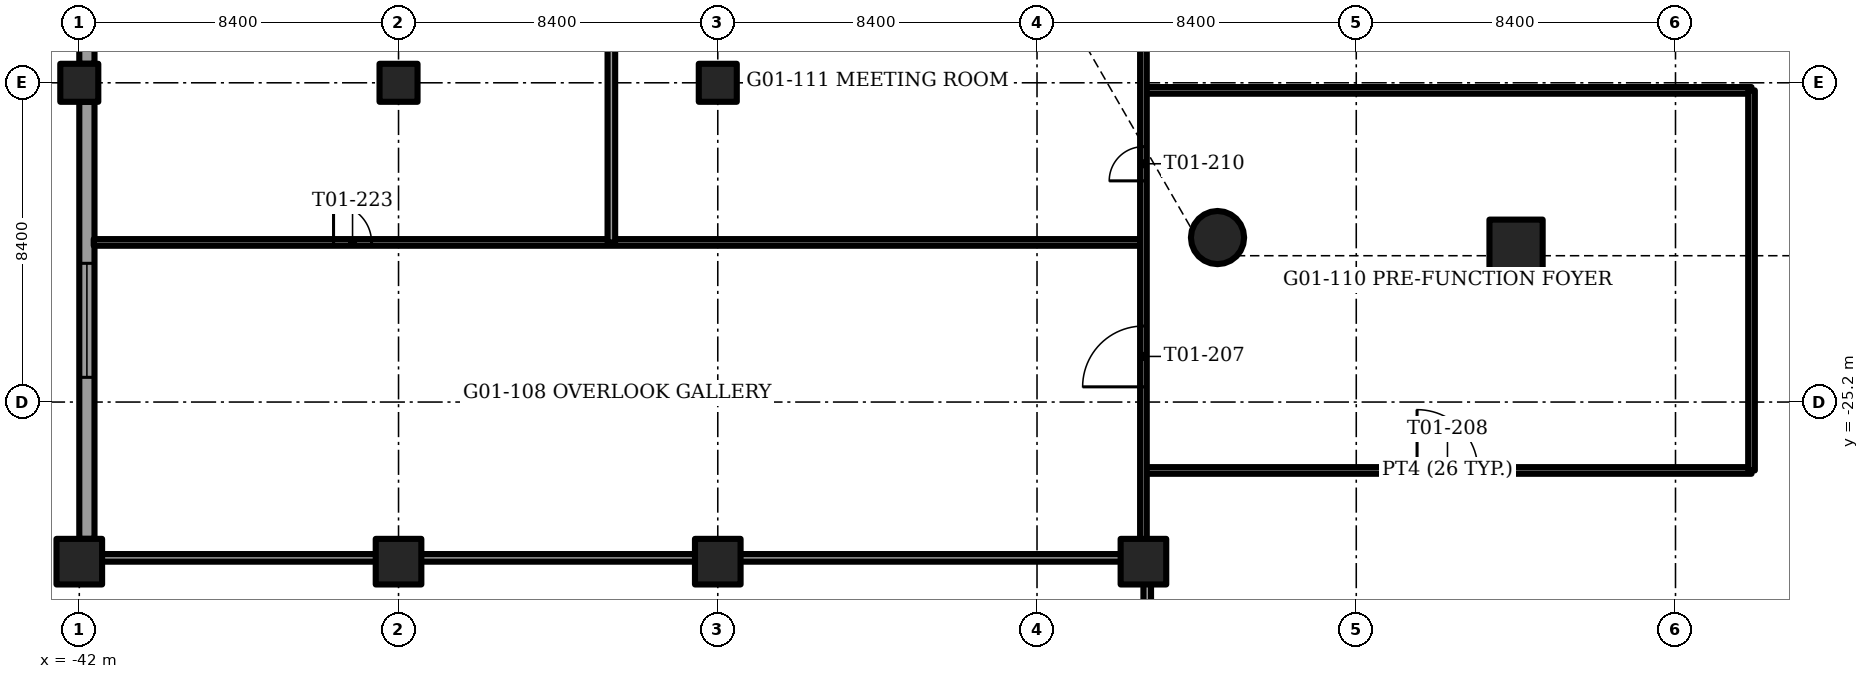
"""IFC4 building model, lengths in metres.
Left out: names, types, materials, properties, quantities, classifications, styles, units other than length and angle.
Written with IfcOpenShell. Run it as: python <this file> out.ifc"""

import sys

from ifc_helpers import new_model, si_unit, direction, frame, frame_2d, origin, origin_2d, place, context, subcontext, project, spatial, rectangle, circle, extrude, element, fill, save


model = new_model("IFC4")
c1 = context("Model", 3, precision=1e-05, world=origin(), true_north=direction((0.0, 1.0)))
c2 = subcontext(c1, "Body", "Model", "MODEL_VIEW")
j1 = project(units=[si_unit("LENGTHUNIT", "METRE"), si_unit("PLANEANGLEUNIT", "RADIAN")], contexts=[c1])
p1 = place(None, origin())
s1 = spatial("IfcSite", under=j1, at=p1, CompositionType="ELEMENT")
p2 = place(p1, origin())
s2 = spatial("IfcBuilding", under=s1, at=p2, CompositionType="ELEMENT")
p3 = place(p2, frame((0.0, 0.0, 6.0)))
s3 = spatial("IfcBuildingStorey", under=s2, at=p3, CompositionType="ELEMENT", Elevation=6.0)
for number, where, z_axis, x_axis in (
    (1, (-42.0, -16.8, -0.35), (0.0, 0.0, 1.0), (1.0, 0.0, 0.0)),
    (2, (-33.6, -16.8, -0.35), (0.0, 0.0, 1.0), (1.0, 0.0, 0.0)),
    (3, (-25.2, -16.8, -0.35), (0.0, 0.0, 1.0), (1.0, 0.0, 0.0)),
):
    element("IfcColumn", number, at=place(p3, frame(where, z_axis=z_axis, x_axis=x_axis)), inside=s3, PredefinedType="COLUMN", context=c2, shape_type="SweptSolid", body=[
        extrude(rectangle(XDim=1.0, YDim=1.0, at=origin_2d()), origin(), (0.0, 0.0, 1.0), 4.0),
    ])
for number, where, z_axis, x_axis in (
    (4, (-14.0, -29.4, -0.35), (0.0, 0.0, 1.0), (1.0, 0.0, 0.0)),
    (5, (-42.0, -29.4, -0.35), (0.0, 0.0, 1.0), (1.0, 0.0, 0.0)),
    (6, (-33.6, -29.4, -0.35), (0.0, 0.0, 1.0), (1.0, 0.0, 0.0)),
    (7, (-25.2, -29.4, -0.35), (0.0, 0.0, 1.0), (1.0, 0.0, 0.0)),
):
    element("IfcColumn", number, at=place(p3, frame(where, z_axis=z_axis, x_axis=x_axis)), inside=s3, PredefinedType="COLUMN", context=c2, shape_type="SweptSolid", body=[
        extrude(rectangle(XDim=1.2, YDim=1.2, at=origin_2d()), origin(), (0.0, 0.0, 1.0), 4.0),
    ])
p4 = place(p3, frame((-12.051, -20.872, -1.2), z_axis=(0.0, 0.0, 1.0), x_axis=(1.0, 0.0, 0.0)))
e8 = element("IfcColumn", 8, at=p4, inside=s3, PredefinedType="COLUMN", context=c2, shape_type="SweptSolid", body=[
    extrude(circle(Radius=0.7, at=origin_2d()), origin(), (0.0, 0.0, 1.0), 4.0),
])
p5 = place(p3, frame((-4.195, -21.1, -1.2), z_axis=(0.0, 0.0, 1.0), x_axis=(-1.0, 0.0, 0.0)))
e9 = element("IfcColumn", 9, at=p5, inside=s3, PredefinedType="COLUMN", context=c2, shape_type="SweptSolid", body=[
    extrude(rectangle(XDim=1.4, YDim=1.4, at=origin_2d()), origin(), (0.0, 0.0, 1.0), 4.0),
])
p6 = place(p3, frame((-41.8, -28.8, 0.0), z_axis=(0.0, 0.0, 1.0), x_axis=(0.0, 1.0, 0.0)))
e10 = element("IfcWall", 10, at=p6, inside=s3, PredefinedType="SOLIDWALL", context=c2, shape_type="SweptSolid", body=[
    extrude(rectangle(XDim=11.5, YDim=0.4, at=frame_2d((5.75, 0.0))), origin(), (0.0, 0.0, 1.0), 3.65),
])
p7 = place(p6, frame((4.25, 0.0, 1.0)))
e11 = element("IfcOpeningElement", 11, at=p7, cuts=e10, PredefinedType="OPENING", context=c2, shape_type="SweptSolid", body=[
    extrude(rectangle(XDim=3.0, YDim=2.2, at=frame_2d((1.5, 1.1))), frame((0.0, 0.2, 0.0), z_axis=(0.0, -1.0, 0.0), x_axis=(1.0, 0.0, 0.0)), (0.0, 0.0, 1.0), 0.4),
])
p8 = place(p3, frame((-41.8, -16.3, 0.0), z_axis=(0.0, 0.0, 1.0), x_axis=(0.0, 1.0, 0.0)))
e12 = element("IfcWall", 12, at=p8, inside=s3, PredefinedType="SOLIDWALL", context=c2, shape_type="SweptSolid", body=[
    extrude(rectangle(XDim=7.4, YDim=0.4, at=frame_2d((3.7, 0.0))), origin(), (0.0, 0.0, 1.0), 3.65),
])
p9 = place(p8, frame((2.2, 0.0, 1.0)))
e13 = element("IfcOpeningElement", 13, at=p9, cuts=e12, PredefinedType="OPENING", context=c2, shape_type="SweptSolid", body=[
    extrude(rectangle(XDim=3.0, YDim=2.2, at=frame_2d((1.5, 1.1))), frame((0.0, 0.2, 0.0), z_axis=(0.0, -1.0, 0.0), x_axis=(1.0, 0.0, 0.0)), (0.0, 0.0, 1.0), 0.4),
])
p10 = place(p3, frame((-13.9, -50.4, 0.0), z_axis=(0.0, 0.0, 1.0), x_axis=(0.0, 1.0, 0.0)))
e14 = element("IfcWall", 14, at=p10, inside=s3, PredefinedType="PARAPET", context=c2, shape_type="SweptSolid", body=[
    extrude(rectangle(XDim=21.0, YDim=0.2, at=frame_2d((10.5, 0.0))), origin(), (0.0, 0.0, 1.0), 1.1),
])
p11 = place(p3, frame((-14.0, -29.3, 0.0), z_axis=(0.0, 0.0, 1.0), x_axis=(-1.0, 0.0, 0.0)))
e15 = element("IfcWall", 15, at=p11, inside=s3, PredefinedType="PARAPET", context=c2, shape_type="SweptSolid", body=[
    extrude(rectangle(XDim=28.0, YDim=0.2, at=frame_2d((14.0, 0.0))), origin(), (0.0, 0.0, 1.0), 1.1),
])
p12 = place(p3, frame((-14.0, -27.0, 0.0), z_axis=(0.0, 0.0, 1.0), x_axis=(1.0, 0.0, 0.0)))
e16 = element("IfcWall", 16, at=p12, inside=s3, PredefinedType="PARTITIONING", context=c2, shape_type="SweptSolid", body=[
    extrude(rectangle(XDim=16.0, YDim=0.175, at=frame_2d((8.0, 0.0))), origin(), (0.0, 0.0, 1.0), 3.65),
])
p13 = place(p12, frame((7.2, 0.0, 0.0)))
e17 = element("IfcOpeningElement", 17, at=p13, cuts=e16, PredefinedType="OPENING", context=c2, shape_type="SweptSolid", body=[
    extrude(rectangle(XDim=1.6, YDim=2.1, at=frame_2d((0.8, 1.05))), frame((0.0, 0.087, 0.0), z_axis=(0.0, -1.0, 0.0), x_axis=(1.0, 0.0, 0.0)), (0.0, 0.0, 1.0), 0.175),
])
p14 = place(p3, frame((-41.62, -21.0, 0.0), z_axis=(0.0, 0.0, 1.0), x_axis=(1.0, 0.0, 0.0)))
e18 = element("IfcWall", 18, at=p14, inside=s3, PredefinedType="PARTITIONING", context=c2, shape_type="SweptSolid", body=[
    extrude(rectangle(XDim=27.62, YDim=0.175, at=frame_2d((13.81, 0.0))), origin(), (0.0, 0.0, 1.0), 3.65),
])
p15 = place(p14, frame((6.31, 0.0, 0.0)))
e19 = element("IfcOpeningElement", 19, at=p15, cuts=e18, PredefinedType="OPENING", context=c2, shape_type="SweptSolid", body=[
    extrude(rectangle(XDim=1.0, YDim=2.1, at=frame_2d((0.5, 1.05))), frame((0.0, 0.087, 0.0), z_axis=(0.0, -1.0, 0.0), x_axis=(1.0, 0.0, 0.0)), (0.0, 0.0, 1.0), 0.175),
])
p16 = place(p3, frame((-14.0, -17.0, 0.0), z_axis=(0.0, 0.0, 1.0), x_axis=(1.0, 0.0, 0.0)))
e20 = element("IfcWall", 20, at=p16, inside=s3, PredefinedType="PARTITIONING", context=c2, shape_type="SweptSolid", body=[
    extrude(rectangle(XDim=16.0, YDim=0.175, at=frame_2d((8.0, 0.0))), origin(), (0.0, 0.0, 1.0), 3.65),
])
p17 = place(p3, frame((-14.0, -29.195, 0.0), z_axis=(0.0, 0.0, 1.0), x_axis=(0.0, 1.0, 0.0)))
e21 = element("IfcWall", 21, at=p17, inside=s3, PredefinedType="PARTITIONING", context=c2, shape_type="SweptSolid", body=[
    extrude(rectangle(XDim=45.995, YDim=0.175, at=frame_2d((22.998, 0.0))), origin(), (0.0, 0.0, 1.0), 2.8),
])
p18 = place(p17, frame((4.395, 0.0, 0.0)))
e22 = element("IfcOpeningElement", 22, at=p18, cuts=e21, PredefinedType="OPENING", context=c2, shape_type="SweptSolid", body=[
    extrude(rectangle(XDim=1.6, YDim=2.1, at=frame_2d((0.8, 1.05))), frame((0.0, 0.087, 0.0), z_axis=(0.0, -1.0, 0.0), x_axis=(1.0, 0.0, 0.0)), (0.0, 0.0, 1.0), 0.175),
])
p19 = place(p17, frame((9.815, 0.0, 0.0)))
e23 = element("IfcOpeningElement", 23, at=p19, cuts=e21, PredefinedType="OPENING", context=c2, shape_type="SweptSolid", body=[
    extrude(rectangle(XDim=0.9, YDim=2.1, at=frame_2d((0.45, 1.05))), frame((0.0, 0.087, 0.0), z_axis=(0.0, -1.0, 0.0), x_axis=(1.0, 0.0, 0.0)), (0.0, 0.0, 1.0), 0.175),
])
p20 = place(p17, frame((20.595, 0.0, 0.0)))
e24 = element("IfcOpeningElement", 24, at=p20, cuts=e21, PredefinedType="OPENING", context=c2, shape_type="SweptSolid", body=[
    extrude(rectangle(XDim=1.0, YDim=2.1, at=frame_2d((0.5, 1.05))), frame((0.0, 0.087, 0.0), z_axis=(0.0, -1.0, 0.0), x_axis=(1.0, 0.0, 0.0)), (0.0, 0.0, 1.0), 0.175),
])
p21 = place(p17, frame((28.595, 0.0, 0.0)))
e25 = element("IfcOpeningElement", 25, at=p21, cuts=e21, PredefinedType="OPENING", context=c2, shape_type="SweptSolid", body=[
    extrude(rectangle(XDim=1.0, YDim=2.1, at=frame_2d((0.5, 1.05))), frame((0.0, 0.087, 0.0), z_axis=(0.0, -1.0, 0.0), x_axis=(1.0, 0.0, 0.0)), (0.0, 0.0, 1.0), 0.175),
])
p22 = place(p17, frame((35.445, 0.0, 0.0)))
e26 = element("IfcOpeningElement", 26, at=p22, cuts=e21, PredefinedType="OPENING", context=c2, shape_type="SweptSolid", body=[
    extrude(rectangle(XDim=1.0, YDim=2.1, at=frame_2d((0.5, 1.05))), frame((0.0, 0.087, 0.0), z_axis=(0.0, -1.0, 0.0), x_axis=(1.0, 0.0, 0.0)), (0.0, 0.0, 1.0), 0.175),
])
p23 = place(p17, frame((41.628, 0.0, 0.0)))
e27 = element("IfcOpeningElement", 27, at=p23, cuts=e21, PredefinedType="OPENING", context=c2, shape_type="SweptSolid", body=[
    extrude(rectangle(XDim=1.0, YDim=2.1, at=frame_2d((0.5, 1.05))), frame((0.0, 0.087, 0.0), z_axis=(0.0, -1.0, 0.0), x_axis=(1.0, 0.0, 0.0)), (0.0, 0.0, 1.0), 0.175),
])
p24 = place(p3, frame((2.0, -27.0, 0.0), z_axis=(0.0, 0.0, 1.0), x_axis=(0.0, 1.0, 0.0)))
e28 = element("IfcWall", 28, at=p24, inside=s3, PredefinedType="PARTITIONING", context=c2, shape_type="SweptSolid", body=[
    extrude(rectangle(XDim=10.0, YDim=0.175, at=frame_2d((5.0, 0.0))), origin(), (0.0, 0.0, 1.0), 2.8),
])
p25 = place(p3, frame((-28.0, -21.0, 0.0), z_axis=(0.0, 0.0, 1.0), x_axis=(0.0, 1.0, 0.0)))
e29 = element("IfcWall", 29, at=p25, inside=s3, PredefinedType="PARTITIONING", context=c2, shape_type="SweptSolid", body=[
    extrude(rectangle(XDim=37.8, YDim=0.2, at=frame_2d((18.9, 0.0))), origin(), (0.0, 0.0, 1.0), 3.65),
])
p26 = place(p25, frame((19.45, 0.0, 0.0)))
e30 = element("IfcOpeningElement", 30, at=p26, cuts=e29, PredefinedType="OPENING", context=c2, shape_type="SweptSolid", body=[
    extrude(rectangle(XDim=1.0, YDim=2.1, at=frame_2d((0.5, 1.05))), frame((0.0, 0.1, 0.0), z_axis=(0.0, -1.0, 0.0), x_axis=(1.0, 0.0, 0.0)), (0.0, 0.0, 1.0), 0.2),
])
p27 = place(p7, origin())
e31 = element("IfcWindow", 31, at=p27, inside=s3, PartitioningType="SINGLE_PANEL", PredefinedType="WINDOW", context=c2, shape_type="SweptSolid", body=[
    extrude(rectangle(XDim=3.0, YDim=2.2, at=frame_2d((1.5, 1.1))), frame((0.0, 0.03, 0.0), z_axis=(0.0, -1.0, 0.0), x_axis=(1.0, 0.0, 0.0)), (0.0, 0.0, 1.0), 0.06),
])
fill(e11, e31)
p28 = place(p18, origin())
e32 = element("IfcDoor", 32, at=p28, inside=s3, OperationType="DOUBLE_DOOR_SINGLE_SWING", PredefinedType="DOOR", context=c2, shape_type="SweptSolid", body=[
    extrude(rectangle(XDim=1.6, YDim=2.1, at=frame_2d((0.8, 1.05))), frame((0.0, 0.025, 0.0), z_axis=(0.0, -1.0, 0.0), x_axis=(1.0, 0.0, 0.0)), (0.0, 0.0, 1.0), 0.05),
])
fill(e22, e32)
p29 = place(p13, origin())
e33 = element("IfcDoor", 33, at=p29, inside=s3, OperationType="DOUBLE_DOOR_SINGLE_SWING", PredefinedType="DOOR", context=c2, shape_type="SweptSolid", body=[
    extrude(rectangle(XDim=1.6, YDim=2.1, at=frame_2d((0.8, 1.05))), frame((0.0, 0.025, 0.0), z_axis=(0.0, -1.0, 0.0), x_axis=(1.0, 0.0, 0.0)), (0.0, 0.0, 1.0), 0.05),
])
fill(e17, e33)
p30 = place(p19, origin())
e34 = element("IfcDoor", 34, at=p30, inside=s3, OperationType="SINGLE_SWING_RIGHT", PredefinedType="DOOR", context=c2, shape_type="SweptSolid", body=[
    extrude(rectangle(XDim=0.9, YDim=2.1, at=frame_2d((0.45, 1.05))), frame((0.0, 0.025, 0.0), z_axis=(0.0, -1.0, 0.0), x_axis=(1.0, 0.0, 0.0)), (0.0, 0.0, 1.0), 0.05),
])
fill(e23, e34)
p31 = place(p15, origin())
e35 = element("IfcDoor", 35, at=p31, inside=s3, OperationType="SINGLE_SWING_LEFT", PredefinedType="DOOR", context=c2, shape_type="SweptSolid", body=[
    extrude(rectangle(XDim=1.0, YDim=2.1, at=frame_2d((0.5, 1.05))), frame((0.0, 0.025, 0.0), z_axis=(0.0, -1.0, 0.0), x_axis=(1.0, 0.0, 0.0)), (0.0, 0.0, 1.0), 0.05),
])
fill(e19, e35)
save(model, sys.argv[1])
